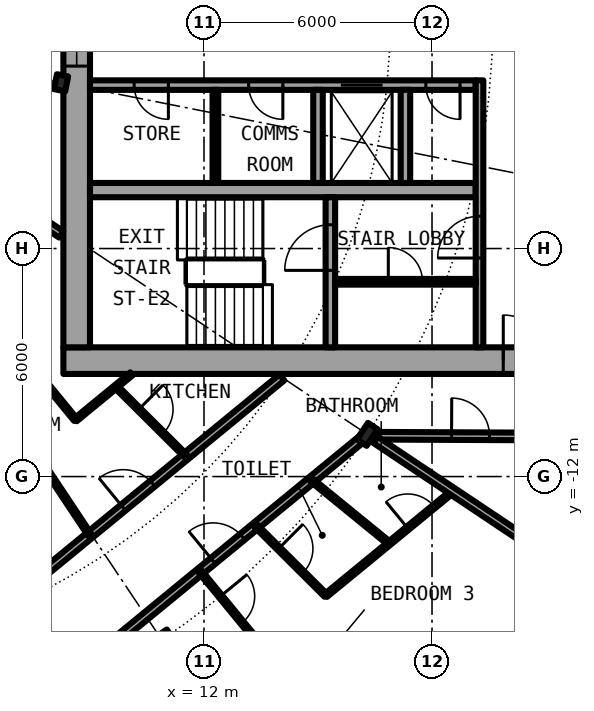
"""IFC4 building model, lengths in metres.
Left out: names, types, materials, properties, quantities, classifications, styles, units other than length and angle.
Written with IfcOpenShell. Run it as: python <this file> out.ifc"""

import sys

from ifc_helpers import new_model, si_unit, direction, frame, frame_2d, origin, origin_2d, place, context, subcontext, project, spatial, rectangle, i_section, extrude, element, fill, save


model = new_model("IFC4")
c1 = context("Model", 3, precision=1e-05, world=origin(), true_north=direction((0.0, 1.0)))
c2 = subcontext(c1, "Body", "Model", "MODEL_VIEW")
j1 = project(units=[si_unit("LENGTHUNIT", "METRE"), si_unit("PLANEANGLEUNIT", "RADIAN")], contexts=[c1])
p1 = place(None, origin())
s1 = spatial("IfcSite", under=j1, at=p1, CompositionType="ELEMENT")
p2 = place(p1, origin())
s2 = spatial("IfcBuilding", under=s1, at=p2, CompositionType="ELEMENT")
p3 = place(p2, frame((0.0, 0.0, 63.6)))
s3 = spatial("IfcBuildingStorey", under=s2, at=p3, CompositionType="ELEMENT", Elevation=63.6)
for number, where, z_axis, x_axis in (
    (1, (10.889, -16.297, 0.0), (0.0, 0.0, 1.0), (0.556, -0.831, 0.0)),
    (2, (16.297, -10.889, 0.0), (0.0, 0.0, 1.0), (0.831, -0.556, 0.0)),
):
    element("IfcColumn", number, at=place(p3, frame(where, z_axis=z_axis, x_axis=x_axis)), inside=s3, PredefinedType="COLUMN", context=c2, shape_type="SweptSolid", body=[
        extrude(i_section(OverallWidth=0.306, OverallDepth=0.524, WebThickness=0.021, FlangeThickness=0.04, FilletRadius=0.027, at=origin_2d()), origin(), (0.0, 0.0, 1.0), 3.05),
    ])
p4 = place(p3, frame((8.239, -1.639, 0.0), z_axis=(0.0, 0.0, 1.0), x_axis=(0.980785280403, -0.195090322016, 0.0)))
e3 = element("IfcColumn", 3, at=p4, inside=s3, PredefinedType="COLUMN", context=c2, shape_type="SweptSolid", body=[
    extrude(i_section(OverallWidth=0.3, OverallDepth=0.4, WebThickness=0.013, FlangeThickness=0.024, FilletRadius=0.027, at=origin_2d()), origin(), (0.0, 0.0, 1.0), 3.05),
])
p5 = place(p3, frame((19.304, -19.304, 0.0), z_axis=(0.0, 0.0, 1.0), x_axis=(0.634382322723, 0.773019449054, 0.0)))
e4 = element("IfcWall", 4, at=p5, inside=s3, PredefinedType="SOLIDWALL", context=c2, shape_type="SweptSolid", body=[
    extrude(rectangle(XDim=5.352, YDim=0.25, at=frame_2d((2.676, 0.0))), origin(), (0.0, 0.0, 1.0), 2.7),
])
p6 = place(p5, frame((0.841, 0.0, 0.0)))
e5 = element("IfcOpeningElement", 5, at=p6, cuts=e4, PredefinedType="OPENING", context=c2, shape_type="SweptSolid", body=[
    extrude(rectangle(XDim=1.0, YDim=2.2, at=frame_2d((0.5, 1.1))), frame((0.0, 0.135, 0.0), z_axis=(0.0, -1.0, 0.0), x_axis=(1.0, 0.0, 0.0)), (0.0, 0.0, 1.0), 0.27),
])
p7 = place(p5, frame((3.111, 0.0, 0.3)))
e6 = element("IfcOpeningElement", 6, at=p7, cuts=e4, PredefinedType="OPENING", context=c2, shape_type="SweptSolid", body=[
    extrude(rectangle(XDim=1.8, YDim=2.1, at=frame_2d((0.9, 1.05))), frame((0.0, 0.135, 0.0), z_axis=(0.0, -1.0, 0.0), x_axis=(1.0, 0.0, 0.0)), (0.0, 0.0, 1.0), 0.27),
])
p8 = place(p3, frame((8.3, -8.95, 0.0), z_axis=(0.0, 0.0, 1.0), x_axis=(1.0, 0.0, 0.0)))
e7 = element("IfcWall", 7, at=p8, inside=s3, PredefinedType="SHEAR", context=c2, shape_type="SweptSolid", body=[
    extrude(rectangle(XDim=14.0, YDim=0.7, at=frame_2d((7.0, 0.0))), origin(), (0.0, 0.0, 1.0), 3.05),
])
p9 = place(p8, frame((11.575, 0.0, 0.0)))
e8 = element("IfcOpeningElement", 8, at=p9, cuts=e7, PredefinedType="OPENING", context=c2, shape_type="SweptSolid", body=[
    extrude(rectangle(XDim=1.2, YDim=2.3, at=frame_2d((0.6, 1.15))), frame((0.0, 0.36, 0.0), z_axis=(0.0, -1.0, 0.0), x_axis=(1.0, 0.0, 0.0)), (0.0, 0.0, 1.0), 0.72),
])
p10 = place(p3, frame((8.65, -8.6, 0.0), z_axis=(0.0, 0.0, 1.0), x_axis=(0.0, 1.0, 0.0)))
e9 = element("IfcWall", 9, at=p10, inside=s3, PredefinedType="SHEAR", context=c2, shape_type="SweptSolid", body=[
    extrude(rectangle(XDim=17.2, YDim=0.7, at=frame_2d((8.6, 0.0))), origin(), (0.0, 0.0, 1.0), 3.05),
])
p11 = place(p10, frame((7.4, 0.0, 0.1)))
e10 = element("IfcOpeningElement", 10, at=p11, cuts=e9, PredefinedType="OPENING", context=c2, shape_type="SweptSolid", body=[
    extrude(rectangle(XDim=2.4, YDim=2.2, at=frame_2d((1.2, 1.1))), frame((0.0, 0.36, 0.0), z_axis=(0.0, -1.0, 0.0), x_axis=(1.0, 0.0, 0.0)), (0.0, 0.0, 1.0), 0.72),
])
p12 = place(p3, frame((19.15, -1.7, 0.0), z_axis=(0.0, 0.0, 1.0), x_axis=(-1.0, 0.0, 0.0)))
e11 = element("IfcWall", 11, at=p12, inside=s3, PredefinedType="SHEAR", context=c2, shape_type="SweptSolid", body=[
    extrude(rectangle(XDim=10.15, YDim=0.25, at=frame_2d((5.075, 0.0))), origin(), (0.0, 0.0, 1.0), 3.05),
])
p13 = place(p12, frame((2.45, 0.0, 0.0)))
e12 = element("IfcOpeningElement", 12, at=p13, cuts=e11, PredefinedType="OPENING", context=c2, shape_type="SweptSolid", body=[
    extrude(rectangle(XDim=1.1, YDim=2.3, at=frame_2d((0.55, 1.15))), frame((0.0, 0.135, 0.0), z_axis=(0.0, -1.0, 0.0), x_axis=(1.0, 0.0, 0.0)), (0.0, 0.0, 1.0), 0.27),
])
p14 = place(p12, frame((8.087, 0.0, 0.0)))
e13 = element("IfcOpeningElement", 13, at=p14, cuts=e11, PredefinedType="OPENING", context=c2, shape_type="SweptSolid", body=[
    extrude(rectangle(XDim=0.9, YDim=2.3, at=frame_2d((0.45, 1.15))), frame((0.0, 0.135, 0.0), z_axis=(0.0, -1.0, 0.0), x_axis=(1.0, 0.0, 0.0)), (0.0, 0.0, 1.0), 0.27),
])
p15 = place(p12, frame((5.075, 0.0, 0.0)))
e14 = element("IfcOpeningElement", 14, at=p15, cuts=e11, PredefinedType="OPENING", context=c2, shape_type="SweptSolid", body=[
    extrude(rectangle(XDim=0.9, YDim=2.3, at=frame_2d((0.45, 1.15))), frame((0.0, 0.135, 0.0), z_axis=(0.0, -1.0, 0.0), x_axis=(1.0, 0.0, 0.0)), (0.0, 0.0, 1.0), 0.27),
])
p16 = place(p12, frame((0.413, 0.0, 0.0)))
e15 = element("IfcOpeningElement", 15, at=p16, cuts=e11, PredefinedType="OPENING", context=c2, shape_type="SweptSolid", body=[
    extrude(rectangle(XDim=0.9, YDim=2.3, at=frame_2d((0.45, 1.15))), frame((0.0, 0.135, 0.0), z_axis=(0.0, -1.0, 0.0), x_axis=(1.0, 0.0, 0.0)), (0.0, 0.0, 1.0), 0.27),
])
p17 = place(p3, frame((9.0, -4.462, 0.0), z_axis=(0.0, 0.0, 1.0), x_axis=(1.0, 0.0, 0.0)))
e16 = element("IfcWall", 16, at=p17, inside=s3, PredefinedType="SHEAR", context=c2, shape_type="SweptSolid", body=[
    extrude(rectangle(XDim=10.15, YDim=0.375, at=frame_2d((5.075, 0.0))), origin(), (0.0, 0.0, 1.0), 3.05),
])
p18 = place(p3, frame((15.325, -8.6, 0.0), z_axis=(0.0, 0.0, 1.0), x_axis=(0.0, 1.0, 0.0)))
e17 = element("IfcWall", 17, at=p18, inside=s3, PredefinedType="SHEAR", context=c2, shape_type="SweptSolid", body=[
    extrude(rectangle(XDim=3.95, YDim=0.25, at=frame_2d((1.975, 0.0))), origin(), (0.0, 0.0, 1.0), 3.05),
])
p19 = place(p18, frame((2.025, 0.0, 0.0)))
e18 = element("IfcOpeningElement", 18, at=p19, cuts=e17, PredefinedType="OPENING", context=c2, shape_type="SweptSolid", body=[
    extrude(rectangle(XDim=1.2, YDim=2.3, at=frame_2d((0.6, 1.15))), frame((0.0, 0.135, 0.0), z_axis=(0.0, -1.0, 0.0), x_axis=(1.0, 0.0, 0.0)), (0.0, 0.0, 1.0), 0.27),
])
for number, where, z_axis, x_axis in (
    (19, (15.0, -1.825, 0.0), (0.0, 0.0, 1.0), (0.0, -1.0, 0.0)),
    (20, (17.3, -1.825, 0.0), (0.0, 0.0, 1.0), (0.0, -1.0, 0.0)),
):
    element("IfcWall", number, at=place(p3, frame(where, z_axis=z_axis, x_axis=x_axis)), inside=s3, PredefinedType="SOLIDWALL", context=c2, shape_type="SweptSolid", body=[
        extrude(rectangle(XDim=2.45, YDim=0.25, at=frame_2d((1.225, 0.0))), origin(), (0.0, 0.0, 1.0), 2.7),
    ])
p20 = place(p3, frame((19.25, -8.6, 0.0), z_axis=(0.0, 0.0, 1.0), x_axis=(0.0, 1.0, 0.0)))
e21 = element("IfcWall", 21, at=p20, inside=s3, PredefinedType="SOLIDWALL", context=c2, shape_type="SweptSolid", body=[
    extrude(rectangle(XDim=7.025, YDim=0.2, at=frame_2d((3.513, 0.0))), origin(), (0.0, 0.0, 1.0), 2.7),
])
p21 = place(p20, frame((2.35, 0.0, 0.0)))
e22 = element("IfcOpeningElement", 22, at=p21, cuts=e21, PredefinedType="OPENING", context=c2, shape_type="SweptSolid", body=[
    extrude(rectangle(XDim=1.1, YDim=2.3, at=frame_2d((0.55, 1.15))), frame((0.0, 0.11, 0.0), z_axis=(0.0, -1.0, 0.0), x_axis=(1.0, 0.0, 0.0)), (0.0, 0.0, 1.0), 0.22),
])
p22 = place(p3, frame((12.3, -1.825, 0.0), z_axis=(0.0, 0.0, 1.0), x_axis=(0.0, -1.0, 0.0)))
e23 = element("IfcWall", 23, at=p22, inside=s3, PredefinedType="PARTITIONING", context=c2, shape_type="SweptSolid", body=[
    extrude(rectangle(XDim=2.45, YDim=0.15, at=frame_2d((1.225, 0.0))), origin(), (0.0, 0.0, 1.0), 2.7),
])
p23 = place(p3, frame((15.45, -6.875, 0.0), z_axis=(0.0, 0.0, 1.0), x_axis=(1.0, 0.0, 0.0)))
e24 = element("IfcWall", 24, at=p23, inside=s3, PredefinedType="PARTITIONING", context=c2, shape_type="SweptSolid", body=[
    extrude(rectangle(XDim=3.7, YDim=0.15, at=frame_2d((1.85, 0.0))), origin(), (0.0, 0.0, 1.0), 2.7),
])
p24 = place(p23, frame((1.4, 0.0, 0.0)))
e25 = element("IfcOpeningElement", 25, at=p24, cuts=e24, PredefinedType="OPENING", context=c2, shape_type="SweptSolid", body=[
    extrude(rectangle(XDim=0.9, YDim=2.3, at=frame_2d((0.45, 1.15))), frame((0.0, 0.085, 0.0), z_axis=(0.0, -1.0, 0.0), x_axis=(1.0, 0.0, 0.0)), (0.0, 0.0, 1.0), 0.17),
])
p25 = place(p3, frame((15.206, -15.127, 0.0), z_axis=(0.0, 0.0, 1.0), x_axis=(0.772975913823, 0.634435368379, 0.0)))
e26 = element("IfcWall", 26, at=p25, inside=s3, PredefinedType="PARTITIONING", context=c2, shape_type="SweptSolid", body=[
    extrude(rectangle(XDim=4.316, YDim=0.1, at=frame_2d((2.158, 0.0))), origin(), (0.0, 0.0, 1.0), 2.7),
])
p26 = place(p25, frame((2.787, 0.0, 0.0)))
e27 = element("IfcOpeningElement", 27, at=p26, cuts=e26, PredefinedType="OPENING", context=c2, shape_type="SweptSolid", body=[
    extrude(rectangle(XDim=0.9, YDim=2.3, at=frame_2d((0.45, 1.15))), frame((0.0, 0.06, 0.0), z_axis=(0.0, -1.0, 0.0), x_axis=(1.0, 0.0, 0.0)), (0.0, 0.0, 1.0), 0.12),
])
p27 = place(p3, frame((7.498, -18.109, 0.0), z_axis=(0.0, 0.0, 1.0), x_axis=(0.773076379635, 0.634312944256, 0.0)))
e28 = element("IfcWall", 28, at=p27, inside=s3, PredefinedType="PARTITIONING", context=c2, shape_type="SweptSolid", body=[
    extrude(rectangle(XDim=11.221, YDim=0.2, at=frame_2d((5.611, 0.0))), origin(), (0.0, 0.0, 1.0), 2.38),
])
p28 = place(p27, frame((6.132, 0.0, 0.0)))
e29 = element("IfcOpeningElement", 29, at=p28, cuts=e28, PredefinedType="OPENING", context=c2, shape_type="SweptSolid", body=[
    extrude(rectangle(XDim=1.0, YDim=2.3, at=frame_2d((0.5, 1.15))), frame((0.0, 0.11, 0.0), z_axis=(0.0, -1.0, 0.0), x_axis=(1.0, 0.0, 0.0)), (0.0, 0.0, 1.0), 0.22),
])
p29 = place(p3, frame((6.467, -15.614, 0.0), z_axis=(0.0, 0.0, 1.0), x_axis=(0.773074935257, 0.634314704605, 0.0)))
e30 = element("IfcWall", 30, at=p29, inside=s3, PredefinedType="PARTITIONING", context=c2, shape_type="SweptSolid", body=[
    extrude(rectangle(XDim=9.809, YDim=0.2, at=frame_2d((4.904, 0.0))), origin(), (0.0, 0.0, 1.0), 2.7),
])
p30 = place(p29, frame((4.407, 0.0, 0.0)))
e31 = element("IfcOpeningElement", 31, at=p30, cuts=e30, PredefinedType="OPENING", context=c2, shape_type="SweptSolid", body=[
    extrude(rectangle(XDim=1.0, YDim=2.3, at=frame_2d((0.5, 1.15))), frame((0.0, 0.11, 0.0), z_axis=(0.0, -1.0, 0.0), x_axis=(1.0, 0.0, 0.0)), (0.0, 0.0, 1.0), 0.22),
])
p31 = place(p3, frame((8.62, -10.505, 0.0), z_axis=(0.0, 0.0, 1.0), x_axis=(0.772957368531, 0.6344579627, 0.0)))
e32 = element("IfcWall", 32, at=p31, inside=s3, PredefinedType="PARTITIONING", context=c2, shape_type="SweptSolid", body=[
    extrude(rectangle(XDim=1.906, YDim=0.1, at=frame_2d((0.953, 0.0))), origin(), (0.0, 0.0, 1.0), 2.7),
])
p32 = place(p3, frame((16.587, -10.926, 0.0), z_axis=(0.0, 0.0, 1.0), x_axis=(0.999988944514, -0.004702217579, 0.0)))
e33 = element("IfcWall", 33, at=p32, inside=s3, PredefinedType="PARTITIONING", context=c2, shape_type="SweptSolid", body=[
    extrude(rectangle(XDim=5.088, YDim=0.2, at=frame_2d((2.544, 0.0))), origin(), (0.0, 0.0, 1.0), 2.7),
])
p33 = place(p32, frame((1.927, 0.0, 0.0)))
e34 = element("IfcOpeningElement", 34, at=p33, cuts=e33, PredefinedType="OPENING", context=c2, shape_type="SweptSolid", body=[
    extrude(rectangle(XDim=1.0, YDim=2.3, at=frame_2d((0.5, 1.15))), frame((0.0, 0.11, 0.0), z_axis=(0.0, -1.0, 0.0), x_axis=(1.0, 0.0, 0.0)), (0.0, 0.0, 1.0), 0.22),
])
p34 = place(p3, frame((6.513, -4.472, 0.0), z_axis=(0.0, 0.0, 1.0), x_axis=(0.831382204863, -0.555701025225, 0.0)))
e35 = element("IfcWall", 35, at=p34, inside=s3, PredefinedType="PARTITIONING", context=c2, shape_type="SweptSolid", body=[
    extrude(rectangle(XDim=2.082, YDim=0.2, at=frame_2d((1.041, 0.0))), origin(), (0.0, 0.0, 1.0), 2.7),
])
p35 = place(p3, frame((4.898, -5.968, 0.0), z_axis=(0.0, 0.0, 1.0), x_axis=(0.634358693064, -0.773038840249, 0.0)))
e36 = element("IfcWall", 36, at=p35, inside=s3, PredefinedType="PARTITIONING", context=c2, shape_type="SweptSolid", body=[
    extrude(rectangle(XDim=5.868, YDim=0.1, at=frame_2d((2.934, 0.0))), origin(), (0.0, 0.0, 1.0), 2.7),
])
p36 = place(p35, frame((2.484, 0.0, 0.0)))
e37 = element("IfcOpeningElement", 37, at=p36, cuts=e36, PredefinedType="OPENING", context=c2, shape_type="SweptSolid", body=[
    extrude(rectangle(XDim=0.9, YDim=2.3, at=frame_2d((0.45, 1.15))), frame((0.0, 0.06, 0.0), z_axis=(0.0, -1.0, 0.0), x_axis=(1.0, 0.0, 0.0)), (0.0, 0.0, 1.0), 0.12),
])
p37 = place(p3, frame((7.558, -11.376, 0.0), z_axis=(0.0, 0.0, 1.0), x_axis=(0.553615197403, -0.83277260594, 0.0)))
e38 = element("IfcWall", 38, at=p37, inside=s3, PredefinedType="PARTITIONING", context=c2, shape_type="SweptSolid", body=[
    extrude(rectangle(XDim=2.597, YDim=0.1, at=frame_2d((1.299, 0.0))), origin(), (0.0, 0.0, 1.0), 2.7),
])
p38 = place(p3, frame((9.683, -9.632, 0.0), z_axis=(0.0, 0.0, 1.0), x_axis=(0.708796844581, -0.705412668665, 0.0)))
e39 = element("IfcWall", 39, at=p38, inside=s3, PredefinedType="PARTITIONING", context=c2, shape_type="SweptSolid", body=[
    extrude(rectangle(XDim=2.597, YDim=0.1, at=frame_2d((1.299, 0.0))), origin(), (0.0, 0.0, 1.0), 2.7),
])
p39 = place(p38, frame((0.849, 0.0, 0.0)))
e40 = element("IfcOpeningElement", 40, at=p39, cuts=e39, PredefinedType="OPENING", context=c2, shape_type="SweptSolid", body=[
    extrude(rectangle(XDim=0.9, YDim=2.3, at=frame_2d((0.45, 1.15))), frame((0.0, 0.06, 0.0), z_axis=(0.0, -1.0, 0.0), x_axis=(1.0, 0.0, 0.0)), (0.0, 0.0, 1.0), 0.12),
])
p40 = place(p3, frame((11.899, -14.499, 0.0), z_axis=(0.0, 0.0, 1.0), x_axis=(0.634396151441, -0.77300810024, 0.0)))
e41 = element("IfcWall", 41, at=p40, inside=s3, PredefinedType="PARTITIONING", context=c2, shape_type="SweptSolid", body=[
    extrude(rectangle(XDim=8.419, YDim=0.1, at=frame_2d((4.209, 0.0))), origin(), (0.0, 0.0, 1.0), 2.7),
])
p41 = place(p40, frame((0.842, 0.0, 0.0)))
e42 = element("IfcOpeningElement", 42, at=p41, cuts=e41, PredefinedType="OPENING", context=c2, shape_type="SweptSolid", body=[
    extrude(rectangle(XDim=0.9, YDim=2.3, at=frame_2d((0.45, 1.15))), frame((0.0, 0.06, 0.0), z_axis=(0.0, -1.0, 0.0), x_axis=(1.0, 0.0, 0.0)), (0.0, 0.0, 1.0), 0.12),
])
p42 = place(p40, frame((5.051, 0.0, 0.0)))
e43 = element("IfcOpeningElement", 43, at=p42, cuts=e41, PredefinedType="OPENING", context=c2, shape_type="SweptSolid", body=[
    extrude(rectangle(XDim=0.9, YDim=2.3, at=frame_2d((0.45, 1.15))), frame((0.0, 0.06, 0.0), z_axis=(0.0, -1.0, 0.0), x_axis=(1.0, 0.0, 0.0)), (0.0, 0.0, 1.0), 0.12),
])
p43 = place(p3, frame((13.365, -13.296, 0.0), z_axis=(0.0, 0.0, 1.0), x_axis=(0.708843617398, -0.705365668341, 0.0)))
e44 = element("IfcWall", 44, at=p43, inside=s3, PredefinedType="PARTITIONING", context=c2, shape_type="SweptSolid", body=[
    extrude(rectangle(XDim=2.597, YDim=0.1, at=frame_2d((1.299, 0.0))), origin(), (0.0, 0.0, 1.0), 2.7),
])
p44 = place(p43, frame((0.848, 0.0, 0.0)))
e45 = element("IfcOpeningElement", 45, at=p44, cuts=e44, PredefinedType="OPENING", context=c2, shape_type="SweptSolid", body=[
    extrude(rectangle(XDim=0.9, YDim=2.3, at=frame_2d((0.45, 1.15))), frame((0.0, 0.06, 0.0), z_axis=(0.0, -1.0, 0.0), x_axis=(1.0, 0.0, 0.0)), (0.0, 0.0, 1.0), 0.12),
])
p45 = place(p3, frame((14.831, -12.092, 0.0), z_axis=(0.0, 0.0, 1.0), x_axis=(0.774979608522, -0.631986239072, 0.0)))
e46 = element("IfcWall", 46, at=p45, inside=s3, PredefinedType="PARTITIONING", context=c2, shape_type="SweptSolid", body=[
    extrude(rectangle(XDim=2.636, YDim=0.1, at=frame_2d((1.318, 0.0))), origin(), (0.0, 0.0, 1.0), 2.7),
])
p46 = place(p3, frame((16.515, -11.035, 0.0), z_axis=(0.0, 0.0, 1.0), x_axis=(0.831505405283, -0.555516661303, 0.0)))
e47 = element("IfcWall", 47, at=p46, inside=s3, PredefinedType="PARTITIONING", context=c2, shape_type="SweptSolid", body=[
    extrude(rectangle(XDim=7.312, YDim=0.2, at=frame_2d((3.656, 0.0))), origin(), (0.0, 0.0, 1.0), 2.7),
])
p47 = place(p13, origin())
e48 = element("IfcDoor", 48, at=p47, inside=s3, OperationType="DOUBLE_DOOR_SLIDING", PredefinedType="DOOR", context=c2, shape_type="SweptSolid", body=[
    extrude(rectangle(XDim=1.1, YDim=2.3, at=frame_2d((0.55, 1.15))), frame((0.0, 0.025, 0.0), z_axis=(0.0, -1.0, 0.0), x_axis=(1.0, 0.0, 0.0)), (0.0, 0.0, 1.0), 0.05),
])
fill(e12, e48)
p48 = place(p14, origin())
e49 = element("IfcDoor", 49, at=p48, inside=s3, OperationType="SINGLE_SWING_LEFT", PredefinedType="DOOR", context=c2, shape_type="SweptSolid", body=[
    extrude(rectangle(XDim=0.9, YDim=2.3, at=frame_2d((0.45, 1.15))), frame((0.0, 0.025, 0.0), z_axis=(0.0, -1.0, 0.0), x_axis=(1.0, 0.0, 0.0)), (0.0, 0.0, 1.0), 0.05),
])
fill(e13, e49)
p49 = place(p15, origin())
e50 = element("IfcDoor", 50, at=p49, inside=s3, OperationType="SINGLE_SWING_LEFT", PredefinedType="DOOR", context=c2, shape_type="SweptSolid", body=[
    extrude(rectangle(XDim=0.9, YDim=2.3, at=frame_2d((0.45, 1.15))), frame((0.0, 0.025, 0.0), z_axis=(0.0, -1.0, 0.0), x_axis=(1.0, 0.0, 0.0)), (0.0, 0.0, 1.0), 0.05),
])
fill(e14, e50)
p50 = place(p16, origin())
e51 = element("IfcDoor", 51, at=p50, inside=s3, OperationType="SINGLE_SWING_RIGHT", PredefinedType="DOOR", context=c2, shape_type="SweptSolid", body=[
    extrude(rectangle(XDim=0.9, YDim=2.3, at=frame_2d((0.45, 1.15))), frame((0.0, 0.025, 0.0), z_axis=(0.0, -1.0, 0.0), x_axis=(1.0, 0.0, 0.0)), (0.0, 0.0, 1.0), 0.05),
])
fill(e15, e51)
p51 = place(p24, origin())
e52 = element("IfcDoor", 52, at=p51, inside=s3, OperationType="SINGLE_SWING_LEFT", PredefinedType="DOOR", context=c2, shape_type="SweptSolid", body=[
    extrude(rectangle(XDim=0.9, YDim=2.3, at=frame_2d((0.45, 1.15))), frame((0.0, 0.025, 0.0), z_axis=(0.0, -1.0, 0.0), x_axis=(1.0, 0.0, 0.0)), (0.0, 0.0, 1.0), 0.05),
])
fill(e25, e52)
p52 = place(p19, origin())
e53 = element("IfcDoor", 53, at=p52, inside=s3, OperationType="SINGLE_SWING_LEFT", PredefinedType="DOOR", context=c2, shape_type="SweptSolid", body=[
    extrude(rectangle(XDim=1.2, YDim=2.3, at=frame_2d((0.6, 1.15))), frame((0.0, 0.025, 0.0), z_axis=(0.0, -1.0, 0.0), x_axis=(1.0, 0.0, 0.0)), (0.0, 0.0, 1.0), 0.05),
])
fill(e18, e53)
p53 = place(p21, origin())
e54 = element("IfcDoor", 54, at=p53, inside=s3, OperationType="SINGLE_SWING_RIGHT", PredefinedType="DOOR", context=c2, shape_type="SweptSolid", body=[
    extrude(rectangle(XDim=1.1, YDim=2.3, at=frame_2d((0.55, 1.15))), frame((0.0, 0.025, 0.0), z_axis=(0.0, -1.0, 0.0), x_axis=(1.0, 0.0, 0.0)), (0.0, 0.0, 1.0), 0.05),
])
fill(e22, e54)
p54 = place(p9, origin())
e55 = element("IfcDoor", 55, at=p54, inside=s3, OperationType="SINGLE_SWING_LEFT", PredefinedType="DOOR", context=c2, shape_type="SweptSolid", body=[
    extrude(rectangle(XDim=1.2, YDim=2.3, at=frame_2d((0.6, 1.15))), frame((0.0, 0.025, 0.0), z_axis=(0.0, -1.0, 0.0), x_axis=(1.0, 0.0, 0.0)), (0.0, 0.0, 1.0), 0.05),
])
fill(e8, e55)
p55 = place(p11, origin())
e56 = element("IfcWindow", 56, at=p55, inside=s3, PartitioningType="SINGLE_PANEL", PredefinedType="WINDOW", context=c2, shape_type="SweptSolid", body=[
    extrude(rectangle(XDim=2.4, YDim=2.2, at=frame_2d((1.2, 1.1))), frame((0.0, 0.03, 0.0), z_axis=(0.0, -1.0, 0.0), x_axis=(1.0, 0.0, 0.0)), (0.0, 0.0, 1.0), 0.06),
])
fill(e10, e56)
p56 = place(p28, origin())
e57 = element("IfcDoor", 57, at=p56, inside=s3, OperationType="SINGLE_SWING_RIGHT", PredefinedType="DOOR", context=c2, shape_type="SweptSolid", body=[
    extrude(rectangle(XDim=1.0, YDim=2.3, at=frame_2d((0.5, 1.15))), frame((0.0, 0.025, 0.0), z_axis=(0.0, -1.0, 0.0), x_axis=(1.0, 0.0, 0.0)), (0.0, 0.0, 1.0), 0.05),
])
fill(e29, e57)
p57 = place(p26, origin())
e58 = element("IfcDoor", 58, at=p57, inside=s3, OperationType="SINGLE_SWING_RIGHT", PredefinedType="DOOR", context=c2, shape_type="SweptSolid", body=[
    extrude(rectangle(XDim=0.9, YDim=2.3, at=frame_2d((0.45, 1.15))), frame((0.0, 0.025, 0.0), z_axis=(0.0, -1.0, 0.0), x_axis=(1.0, 0.0, 0.0)), (0.0, 0.0, 1.0), 0.05),
])
fill(e27, e58)
p58 = place(p44, origin())
e59 = element("IfcDoor", 59, at=p58, inside=s3, OperationType="SINGLE_SWING_LEFT", PredefinedType="DOOR", context=c2, shape_type="SweptSolid", body=[
    extrude(rectangle(XDim=0.9, YDim=2.3, at=frame_2d((0.45, 1.15))), frame((0.0, 0.025, 0.0), z_axis=(0.0, -1.0, 0.0), x_axis=(1.0, 0.0, 0.0)), (0.0, 0.0, 1.0), 0.05),
])
fill(e45, e59)
p59 = place(p41, origin())
e60 = element("IfcDoor", 60, at=p59, inside=s3, OperationType="SINGLE_SWING_LEFT", PredefinedType="DOOR", context=c2, shape_type="SweptSolid", body=[
    extrude(rectangle(XDim=0.9, YDim=2.3, at=frame_2d((0.45, 1.15))), frame((0.0, 0.025, 0.0), z_axis=(0.0, -1.0, 0.0), x_axis=(1.0, 0.0, 0.0)), (0.0, 0.0, 1.0), 0.05),
])
fill(e42, e60)
p60 = place(p30, origin())
e61 = element("IfcDoor", 61, at=p60, inside=s3, OperationType="SINGLE_SWING_RIGHT", PredefinedType="DOOR", context=c2, shape_type="SweptSolid", body=[
    extrude(rectangle(XDim=1.0, YDim=2.3, at=frame_2d((0.5, 1.15))), frame((0.0, 0.025, 0.0), z_axis=(0.0, -1.0, 0.0), x_axis=(1.0, 0.0, 0.0)), (0.0, 0.0, 1.0), 0.05),
])
fill(e31, e61)
p61 = place(p39, origin())
e62 = element("IfcDoor", 62, at=p61, inside=s3, OperationType="SINGLE_SWING_RIGHT", PredefinedType="DOOR", context=c2, shape_type="SweptSolid", body=[
    extrude(rectangle(XDim=0.9, YDim=2.3, at=frame_2d((0.45, 1.15))), frame((0.0, 0.025, 0.0), z_axis=(0.0, -1.0, 0.0), x_axis=(1.0, 0.0, 0.0)), (0.0, 0.0, 1.0), 0.05),
])
fill(e40, e62)
p62 = place(p33, origin())
e63 = element("IfcDoor", 63, at=p62, inside=s3, OperationType="SINGLE_SWING_LEFT", PredefinedType="DOOR", context=c2, shape_type="SweptSolid", body=[
    extrude(rectangle(XDim=1.0, YDim=2.3, at=frame_2d((0.5, 1.15))), frame((0.0, 0.025, 0.0), z_axis=(0.0, -1.0, 0.0), x_axis=(1.0, 0.0, 0.0)), (0.0, 0.0, 1.0), 0.05),
])
fill(e34, e63)
save(model, sys.argv[1])
